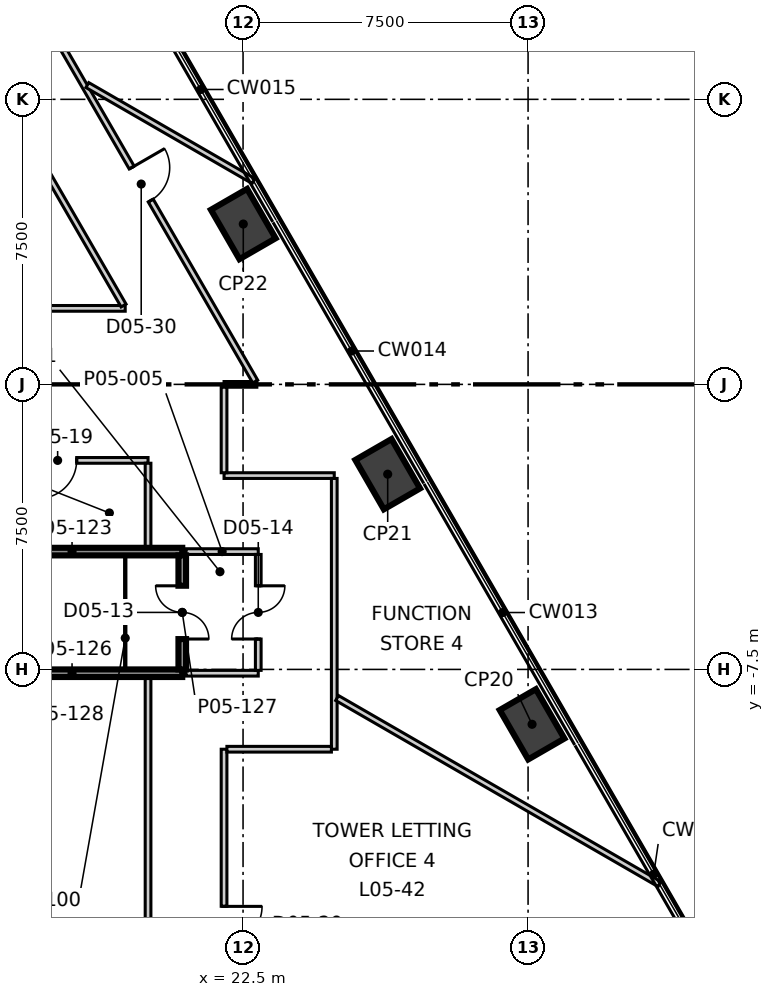
"""IFC4 building model, lengths in metres.
Left out: names, types, materials, properties, quantities, classifications, styles, units other than length and angle.
Written with IfcOpenShell. Run it as: python <this file> out.ifc"""

import sys

from ifc_helpers import new_model, si_unit, direction, frame, frame_2d, origin, origin_2d, place, context, subcontext, project, spatial, rectangle, extrude, element, fill, save


model = new_model("IFC4")
c1 = context("Model", 3, precision=1e-05, world=origin(), true_north=direction((0.0, 1.0)))
c2 = subcontext(c1, "Body", "Model", "MODEL_VIEW")
j1 = project(units=[si_unit("LENGTHUNIT", "METRE"), si_unit("PLANEANGLEUNIT", "RADIAN")], contexts=[c1])
p1 = place(None, origin())
s1 = spatial("IfcSite", under=j1, at=p1, CompositionType="ELEMENT")
p2 = place(p1, origin())
s2 = spatial("IfcBuilding", under=s1, at=p2, CompositionType="ELEMENT")
p3 = place(p2, frame((0.0, 0.0, 30.3)))
s3 = spatial("IfcBuildingStorey", under=s2, at=p3, CompositionType="ELEMENT", Elevation=30.3)
for number, where, z_axis, x_axis in (
    (1, (30.105, -8.944, -0.4), (0.0, 0.0, 1.0), (-0.5, 0.866, 0.0)),
    (2, (26.306, -2.363, -0.4), (0.0, 0.0, 1.0), (-0.5, 0.866, 0.0)),
    (3, (22.506, 4.219, -0.4), (0.0, 0.0, 1.0), (-0.5, 0.866, 0.0)),
):
    element("IfcColumn", number, at=place(p3, frame(where, z_axis=z_axis, x_axis=x_axis)), inside=s3, PredefinedType="COLUMN", context=c2, shape_type="SweptSolid", body=[
        extrude(rectangle(XDim=1.5, YDim=1.1, at=origin_2d()), origin(), (0.0, 0.0, 1.0), 5.1),
    ])
for number, where, z_axis, x_axis in (
    (4, (21.0, -7.6, 0.0), (0.0, 0.0, 1.0), (1.0, 0.0, 0.0)),
    (5, (21.0, -4.4, 0.0), (0.0, 0.0, 1.0), (1.0, 0.0, 0.0)),
):
    element("IfcWall", number, at=place(p3, frame(where, z_axis=z_axis, x_axis=x_axis)), inside=s3, PredefinedType="PARTITIONING", context=c2, shape_type="SweptSolid", body=[
        extrude(rectangle(XDim=1.9, YDim=0.15, at=frame_2d((0.95, 0.0))), origin(), (0.0, 0.0, 1.0), 4.7),
    ])
p4 = place(p3, frame((22.9, -7.525, 0.0), z_axis=(0.0, 0.0, 1.0), x_axis=(0.0, 1.0, 0.0)))
e6 = element("IfcWall", 6, at=p4, inside=s3, PredefinedType="PARTITIONING", context=c2, shape_type="SweptSolid", body=[
    extrude(rectangle(XDim=3.05, YDim=0.15, at=frame_2d((1.525, 0.0))), origin(), (0.0, 0.0, 1.0), 4.7),
])
p5 = place(p4, frame((0.825, 0.0, 0.0)))
e7 = element("IfcOpeningElement", 7, at=p5, cuts=e6, PredefinedType="OPENING", context=c2, shape_type="SweptSolid", body=[
    extrude(rectangle(XDim=1.4, YDim=2.1, at=frame_2d((0.7, 1.05))), frame((0.0, 0.085, 0.0), z_axis=(0.0, -1.0, 0.0), x_axis=(1.0, 0.0, 0.0)), (0.0, 0.0, 1.0), 0.17),
])
p6 = place(p3, frame((22.0, 0.0, 0.0), z_axis=(0.0, 0.0, 1.0), x_axis=(1.0, 0.0, 0.0)))
e8 = element("IfcWall", 8, at=p6, inside=s3, PredefinedType="PARTITIONING", context=c2, shape_type="SweptSolid", body=[
    extrude(rectangle(XDim=0.863, YDim=0.15, at=frame_2d((0.432, 0.0))), origin(), (0.0, 0.0, 1.0), 4.7),
])
p7 = place(p3, frame((22.0, -2.4, 0.0), z_axis=(0.0, 0.0, 1.0), x_axis=(1.0, 0.0, 0.0)))
e9 = element("IfcWall", 9, at=p7, inside=s3, PredefinedType="PARTITIONING", context=c2, shape_type="SweptSolid", body=[
    extrude(rectangle(XDim=2.9, YDim=0.15, at=frame_2d((1.45, 0.0))), origin(), (0.0, 0.0, 1.0), 4.1),
])
p8 = place(p3, frame((22.0, -18.925, 0.0), z_axis=(0.0, 0.0, 1.0), x_axis=(0.0, 1.0, 0.0)))
e10 = element("IfcWall", 10, at=p8, inside=s3, PredefinedType="PARTITIONING", context=c2, shape_type="SweptSolid", body=[
    extrude(rectangle(XDim=9.325, YDim=0.15, at=frame_2d((4.663, 0.0))), origin(), (0.0, 0.0, 1.0), 4.7),
])
p9 = place(p8, frame((4.19, 0.0, 0.0)))
e11 = element("IfcOpeningElement", 11, at=p9, cuts=e10, PredefinedType="OPENING", context=c2, shape_type="SweptSolid", body=[
    extrude(rectangle(XDim=1.0, YDim=2.1, at=frame_2d((0.5, 1.05))), frame((0.0, 0.085, 0.0), z_axis=(0.0, -1.0, 0.0), x_axis=(1.0, 0.0, 0.0)), (0.0, 0.0, 1.0), 0.17),
])
p10 = place(p3, frame((22.0, -2.325, 0.0), z_axis=(0.0, 0.0, 1.0), x_axis=(0.0, 1.0, 0.0)))
e12 = element("IfcWall", 12, at=p10, inside=s3, PredefinedType="PARTITIONING", context=c2, shape_type="SweptSolid", body=[
    extrude(rectangle(XDim=2.25, YDim=0.15, at=frame_2d((1.125, 0.0))), origin(), (0.0, 0.0, 1.0), 4.7),
])
p11 = place(p3, frame((15.935, 12.0, 0.0), z_axis=(0.0, 0.0, 1.0), x_axis=(0.500004336333, -0.866022900187, 0.0)))
e13 = element("IfcWall", 13, at=p11, inside=s3, PredefinedType="PARTITIONING", context=c2, shape_type="SweptSolid", body=[
    extrude(rectangle(XDim=13.77, YDim=0.15, at=frame_2d((6.885, 0.0))), origin(), (0.0, 0.0, 1.0), 4.7),
])
p12 = place(p11, frame((7.27, 0.0, 0.0)))
e14 = element("IfcOpeningElement", 14, at=p12, cuts=e13, PredefinedType="OPENING", context=c2, shape_type="SweptSolid", body=[
    extrude(rectangle(XDim=1.0, YDim=2.1, at=frame_2d((0.5, 1.05))), frame((0.0, 0.085, 0.0), z_axis=(0.0, -1.0, 0.0), x_axis=(1.0, 0.0, 0.0)), (0.0, 0.0, 1.0), 0.17),
])
p13 = place(p3, frame((18.403, 7.875, 0.0), z_axis=(0.0, 0.0, 1.0), x_axis=(0.866002805745, -0.50003913891, 0.0)))
e15 = element("IfcWall", 15, at=p13, inside=s3, PredefinedType="PARTITIONING", context=c2, shape_type="SweptSolid", body=[
    extrude(rectangle(XDim=5.049, YDim=0.15, at=frame_2d((2.525, 0.0))), origin(), (0.0, 0.0, 1.0), 4.7),
])
p14 = place(p3, frame((15.329, -2.0, 0.0), z_axis=(0.0, 0.0, 1.0), x_axis=(1.0, 0.0, 0.0)))
e16 = element("IfcWall", 16, at=p14, inside=s3, PredefinedType="PARTITIONING", context=c2, shape_type="SweptSolid", body=[
    extrude(rectangle(XDim=4.671, YDim=0.15, at=frame_2d((2.335, 0.0))), origin(), (0.0, 0.0, 1.0), 4.1),
])
p15 = place(p14, frame((1.792, 0.0, 0.0)))
e17 = element("IfcOpeningElement", 17, at=p15, cuts=e16, PredefinedType="OPENING", context=c2, shape_type="SweptSolid", body=[
    extrude(rectangle(XDim=1.0, YDim=2.1, at=frame_2d((0.5, 1.05))), frame((0.0, 0.085, 0.0), z_axis=(0.0, -1.0, 0.0), x_axis=(1.0, 0.0, 0.0)), (0.0, 0.0, 1.0), 0.17),
])
p16 = place(p3, frame((20.0, -16.925, 0.0), z_axis=(0.0, 0.0, 1.0), x_axis=(0.0, 1.0, 0.0)))
e18 = element("IfcWall", 18, at=p16, inside=s3, PredefinedType="PARTITIONING", context=c2, shape_type="SweptSolid", body=[
    extrude(rectangle(XDim=9.225, YDim=0.15, at=frame_2d((4.613, 0.0))), origin(), (0.0, 0.0, 1.0), 4.7),
])
p17 = place(p3, frame((20.0, -4.3, 0.0), z_axis=(0.0, 0.0, 1.0), x_axis=(0.0, 1.0, 0.0)))
e19 = element("IfcWall", 19, at=p17, inside=s3, PredefinedType="PARTITIONING", context=c2, shape_type="SweptSolid", body=[
    extrude(rectangle(XDim=2.225, YDim=0.15, at=frame_2d((1.113, 0.0))), origin(), (0.0, 0.0, 1.0), 4.7),
])
p18 = place(p3, frame((24.9, -9.6, 0.0), z_axis=(0.0, 0.0, 1.0), x_axis=(0.0, 1.0, 0.0)))
e20 = element("IfcWall", 20, at=p18, inside=s3, PredefinedType="PARTITIONING", context=c2, shape_type="SweptSolid", body=[
    extrude(rectangle(XDim=7.125, YDim=0.15, at=frame_2d((3.562, 0.0))), origin(), (0.0, 0.0, 1.0), 4.7),
])
p19 = place(p3, frame((22.075, -9.6, 0.0), z_axis=(0.0, 0.0, 1.0), x_axis=(1.0, 0.0, 0.0)))
e21 = element("IfcWall", 21, at=p19, inside=s3, PredefinedType="PARTITIONING", context=c2, shape_type="SweptSolid", body=[
    extrude(rectangle(XDim=2.75, YDim=0.15, at=frame_2d((1.375, 0.0))), origin(), (0.0, 0.0, 1.0), 4.7),
])
p20 = place(p3, frame((24.975, -8.253, 0.0), z_axis=(0.0, 0.0, 1.0), x_axis=(0.866010428405, -0.500025937221, 0.0)))
e22 = element("IfcWall", 22, at=p20, inside=s3, PredefinedType="PARTITIONING", context=c2, shape_type="SweptSolid", body=[
    extrude(rectangle(XDim=9.795, YDim=0.15, at=frame_2d((4.898, 0.0))), origin(), (0.0, 0.0, 1.0), 4.7),
])
p21 = place(p3, frame((13.019, 2.0, 0.0), z_axis=(0.0, 0.0, 1.0), x_axis=(1.0, 0.0, 0.0)))
e23 = element("IfcWall", 23, at=p21, inside=s3, PredefinedType="PARTITIONING", context=c2, shape_type="SweptSolid", body=[
    extrude(rectangle(XDim=6.38, YDim=0.15, at=frame_2d((3.19, 0.0))), origin(), (0.0, 0.0, 1.0), 4.7),
])
p22 = place(p3, frame((14.823, 9.925, 0.0), z_axis=(0.0, 0.0, 1.0), x_axis=(0.500058162134, -0.865991821256, 0.0)))
e24 = element("IfcWall", 24, at=p22, inside=s3, PredefinedType="PARTITIONING", context=c2, shape_type="SweptSolid", body=[
    extrude(rectangle(XDim=9.065, YDim=0.15, at=frame_2d((4.532, 0.0))), origin(), (0.0, 0.0, 1.0), 4.7),
])
p23 = place(p22, frame((4.032, 0.0, 0.0)))
e25 = element("IfcOpeningElement", 25, at=p23, cuts=e24, PredefinedType="OPENING", context=c2, shape_type="SweptSolid", body=[
    extrude(rectangle(XDim=1.0, YDim=2.1, at=frame_2d((0.5, 1.05))), frame((0.0, 0.085, 0.0), z_axis=(0.0, -1.0, 0.0), x_axis=(1.0, 0.0, 0.0)), (0.0, 0.0, 1.0), 0.17),
])
for number, where, z_axis, x_axis in (
    (26, (15.1, -4.4, 0.0), (0.0, 0.0, 1.0), (1.0, 0.0, 0.0)),
    (27, (15.1, -7.6, 0.0), (0.0, 0.0, 1.0), (1.0, 0.0, 0.0)),
):
    element("IfcWall", number, at=place(p3, frame(where, z_axis=z_axis, x_axis=x_axis)), inside=s3, PredefinedType="SOLIDWALL", context=c2, shape_type="SweptSolid", body=[
        extrude(rectangle(XDim=5.8, YDim=0.2, at=frame_2d((2.9, 0.0))), origin(), (0.0, 0.0, 1.0), 4.7),
    ])
p24 = place(p3, frame((20.9, -7.5, 0.0), z_axis=(0.0, 0.0, 1.0), x_axis=(0.0, 1.0, 0.0)))
e28 = element("IfcWall", 28, at=p24, inside=s3, PredefinedType="SOLIDWALL", context=c2, shape_type="SweptSolid", body=[
    extrude(rectangle(XDim=3.0, YDim=0.2, at=frame_2d((1.5, 0.0))), origin(), (0.0, 0.0, 1.0), 4.7),
])
p25 = place(p24, frame((0.8, 0.0, 0.0)))
e29 = element("IfcOpeningElement", 29, at=p25, cuts=e28, PredefinedType="OPENING", context=c2, shape_type="SweptSolid", body=[
    extrude(rectangle(XDim=1.4, YDim=2.1, at=frame_2d((0.7, 1.05))), frame((0.0, 0.11, 0.0), z_axis=(0.0, -1.0, 0.0), x_axis=(1.0, 0.0, 0.0)), (0.0, 0.0, 1.0), 0.22),
])
p26 = place(p25, origin())
e30 = element("IfcDoor", 30, at=p26, inside=s3, OperationType="DOUBLE_DOOR_SINGLE_SWING", PredefinedType="DOOR", context=c2, shape_type="SweptSolid", body=[
    extrude(rectangle(XDim=1.4, YDim=2.1, at=frame_2d((0.7, 1.05))), frame((0.0, 0.025, 0.0), z_axis=(0.0, -1.0, 0.0), x_axis=(1.0, 0.0, 0.0)), (0.0, 0.0, 1.0), 0.05),
])
fill(e29, e30)
p27 = place(p5, origin())
e31 = element("IfcDoor", 31, at=p27, inside=s3, OperationType="DOUBLE_DOOR_SINGLE_SWING", PredefinedType="DOOR", context=c2, shape_type="SweptSolid", body=[
    extrude(rectangle(XDim=1.4, YDim=2.1, at=frame_2d((0.7, 1.05))), frame((0.0, 0.025, 0.0), z_axis=(0.0, -1.0, 0.0), x_axis=(1.0, 0.0, 0.0)), (0.0, 0.0, 1.0), 0.05),
])
fill(e7, e31)
p28 = place(p15, origin())
e32 = element("IfcDoor", 32, at=p28, inside=s3, OperationType="SINGLE_SWING_LEFT", PredefinedType="DOOR", context=c2, shape_type="SweptSolid", body=[
    extrude(rectangle(XDim=1.0, YDim=2.1, at=frame_2d((0.5, 1.05))), frame((0.0, 0.025, 0.0), z_axis=(0.0, -1.0, 0.0), x_axis=(1.0, 0.0, 0.0)), (0.0, 0.0, 1.0), 0.05),
])
fill(e17, e32)
p29 = place(p9, origin())
e33 = element("IfcDoor", 33, at=p29, inside=s3, OperationType="SINGLE_SWING_RIGHT", PredefinedType="DOOR", context=c2, shape_type="SweptSolid", body=[
    extrude(rectangle(XDim=1.0, YDim=2.1, at=frame_2d((0.5, 1.05))), frame((0.0, 0.025, 0.0), z_axis=(0.0, -1.0, 0.0), x_axis=(1.0, 0.0, 0.0)), (0.0, 0.0, 1.0), 0.05),
])
fill(e11, e33)
p30 = place(p12, origin())
e34 = element("IfcDoor", 34, at=p30, inside=s3, OperationType="SINGLE_SWING_RIGHT", PredefinedType="DOOR", context=c2, shape_type="SweptSolid", body=[
    extrude(rectangle(XDim=1.0, YDim=2.1, at=frame_2d((0.5, 1.05))), frame((0.0, 0.025, 0.0), z_axis=(0.0, -1.0, 0.0), x_axis=(1.0, 0.0, 0.0)), (0.0, 0.0, 1.0), 0.05),
])
fill(e14, e34)
save(model, sys.argv[1])
